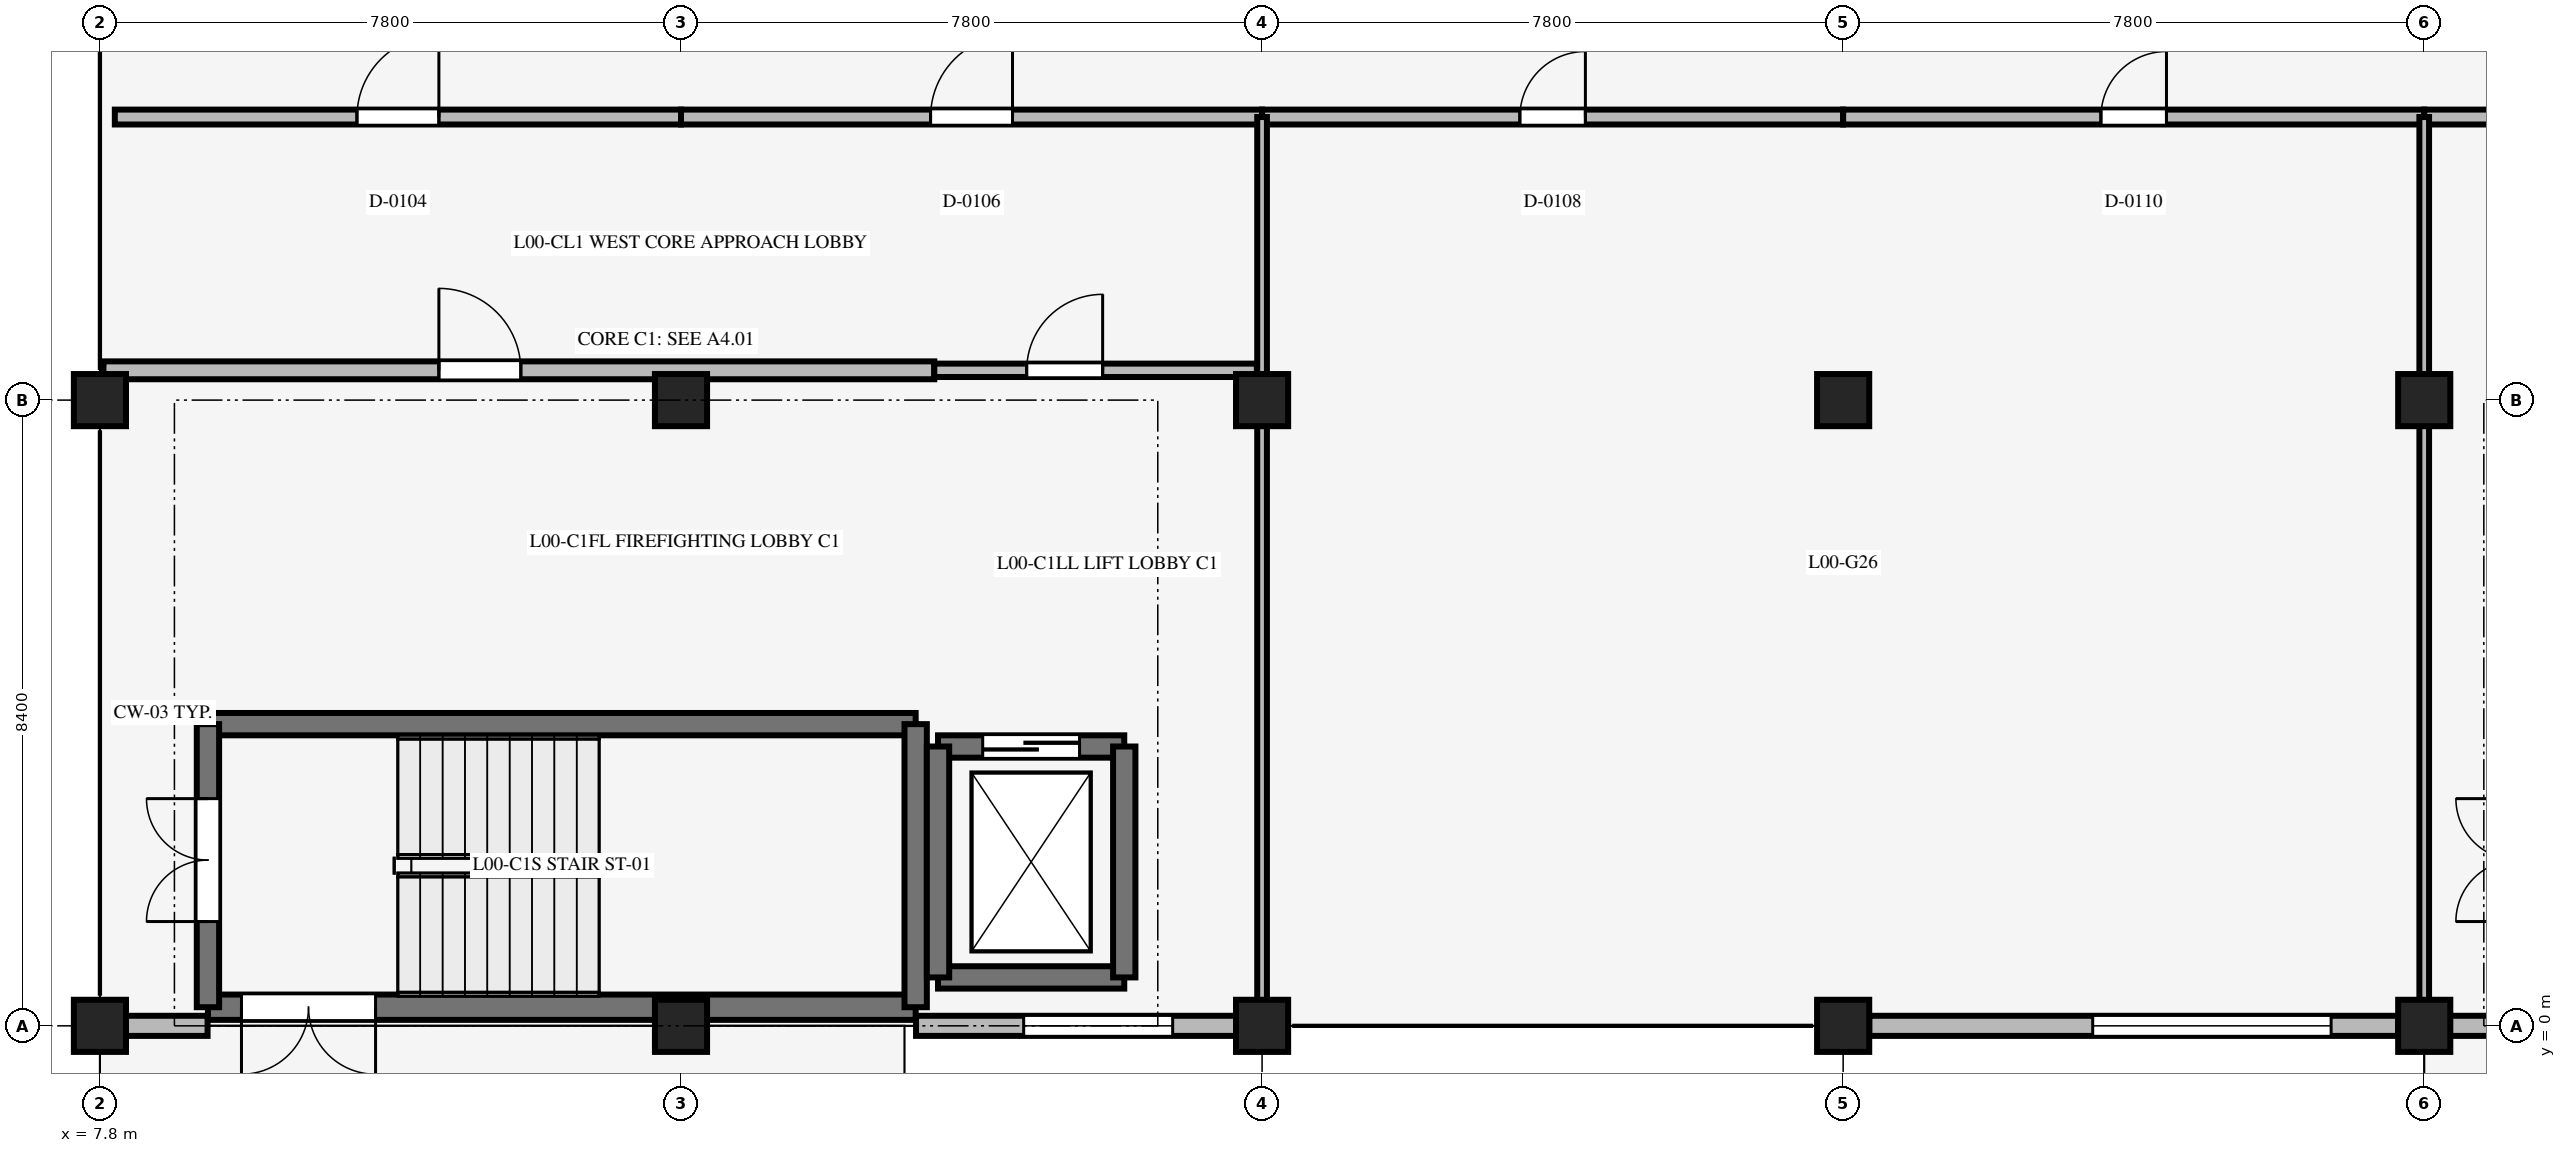
"""IFC4 building model, lengths in metres.
Left out: names, types, materials, properties, quantities, classifications, styles, units other than length and angle.
Written with IfcOpenShell. Run it as: python <this file> out.ifc"""

import sys

from ifc_helpers import new_model, si_unit, direction, frame, frame_2d, origin, origin_2d, place, context, subcontext, project, spatial, rectangle, extrude, element, fill, save


model = new_model("IFC4")
c1 = context("Model", 3, precision=1e-05, world=origin(), true_north=direction((0.0, 1.0)))
c2 = subcontext(c1, "Body", "Model", "MODEL_VIEW")
j1 = project(units=[si_unit("LENGTHUNIT", "METRE"), si_unit("PLANEANGLEUNIT", "RADIAN")], contexts=[c1])
p1 = place(None, origin())
s1 = spatial("IfcSite", under=j1, at=p1, CompositionType="ELEMENT")
p2 = place(p1, origin())
s2 = spatial("IfcBuilding", under=s1, at=p2, CompositionType="ELEMENT")
p3 = place(p2, origin())
s3 = spatial("IfcBuildingStorey", under=s2, at=p3, CompositionType="ELEMENT", Elevation=0.0)
for number, where, z_axis, x_axis in (
    (1, (7.8, 0.0, 0.0), (0.0, 0.0, 1.0), (1.0, 0.0, 0.0)),
    (2, (7.8, 8.4, 0.0), (0.0, 0.0, 1.0), (1.0, 0.0, 0.0)),
    (3, (15.6, 0.0, 0.0), (0.0, 0.0, 1.0), (1.0, 0.0, 0.0)),
    (4, (15.6, 8.4, 0.0), (0.0, 0.0, 1.0), (1.0, 0.0, 0.0)),
    (5, (23.4, 0.0, 0.0), (0.0, 0.0, 1.0), (1.0, 0.0, 0.0)),
    (6, (23.4, 8.4, 0.0), (0.0, 0.0, 1.0), (1.0, 0.0, 0.0)),
    (7, (31.2, 0.0, 0.0), (0.0, 0.0, 1.0), (1.0, 0.0, 0.0)),
    (8, (31.2, 8.4, 0.0), (0.0, 0.0, 1.0), (1.0, 0.0, 0.0)),
    (9, (39.0, 0.0, 0.0), (0.0, 0.0, 1.0), (1.0, 0.0, 0.0)),
    (10, (39.0, 8.4, 0.0), (0.0, 0.0, 1.0), (1.0, 0.0, 0.0)),
):
    element("IfcColumn", number, at=place(p3, frame(where, z_axis=z_axis, x_axis=x_axis)), inside=s3, PredefinedType="COLUMN", context=c2, shape_type="SweptSolid", body=[
        extrude(rectangle(XDim=0.7, YDim=0.7, at=origin_2d()), origin(), (0.0, 0.0, 1.0), 6.0),
    ])
p4 = place(p3, frame((18.75, 0.25, 0.0), z_axis=(0.0, 0.0, 1.0), x_axis=(-1.0, 0.0, 0.0)))
e11 = element("IfcWall", 11, at=p4, inside=s3, PredefinedType="STANDARD", context=c2, shape_type="SweptSolid", body=[
    extrude(rectangle(XDim=9.5, YDim=0.34, at=frame_2d((4.75, 0.0))), origin(), (0.0, 0.0, 1.0), 6.0),
])
p5 = place(p4, frame((7.25, 0.0, 0.0)))
e12 = element("IfcOpeningElement", 12, at=p5, cuts=e11, PredefinedType="OPENING", context=c2, shape_type="SweptSolid", body=[
    extrude(rectangle(XDim=1.8, YDim=2.25, at=frame_2d((0.9, 1.125))), frame((0.0, 0.18, 0.0), z_axis=(0.0, -1.0, 0.0), x_axis=(1.0, 0.0, 0.0)), (0.0, 0.0, 1.0), 0.36),
])
p6 = place(p3, frame((9.25, 4.05, 0.0), z_axis=(0.0, 0.0, 1.0), x_axis=(1.0, 0.0, 0.0)))
e13 = element("IfcWall", 13, at=p6, inside=s3, PredefinedType="SHEAR", context=c2, shape_type="SweptSolid", body=[
    extrude(rectangle(XDim=9.5, YDim=0.3, at=frame_2d((4.75, 0.0))), origin(), (0.0, 0.0, 1.0), 6.0),
])
p7 = place(p3, frame((9.25, 0.25, 0.0), z_axis=(0.0, 0.0, 1.0), x_axis=(0.0, 1.0, 0.0)))
e14 = element("IfcWall", 14, at=p7, inside=s3, PredefinedType="SHEAR", context=c2, shape_type="SweptSolid", body=[
    extrude(rectangle(XDim=3.8, YDim=0.3, at=frame_2d((1.9, 0.0))), origin(), (0.0, 0.0, 1.0), 6.0),
])
p8 = place(p7, frame((1.15, 0.0, 0.0)))
e15 = element("IfcOpeningElement", 15, at=p8, cuts=e14, PredefinedType="OPENING", context=c2, shape_type="SweptSolid", body=[
    extrude(rectangle(XDim=1.65, YDim=2.2, at=frame_2d((0.825, 1.1))), frame((0.0, 0.16, 0.0), z_axis=(0.0, -1.0, 0.0), x_axis=(1.0, 0.0, 0.0)), (0.0, 0.0, 1.0), 0.32),
])
p9 = place(p3, frame((18.75, 0.25, 0.0), z_axis=(0.0, 0.0, 1.0), x_axis=(0.0, 1.0, 0.0)))
e16 = element("IfcWall", 16, at=p9, inside=s3, PredefinedType="SHEAR", context=c2, shape_type="SweptSolid", body=[
    extrude(rectangle(XDim=3.8, YDim=0.3, at=frame_2d((1.9, 0.0))), origin(), (0.0, 0.0, 1.0), 6.0),
])
p10 = place(p3, frame((19.05, 0.65, 0.0), z_axis=(0.0, 0.0, 1.0), x_axis=(1.0, 0.0, 0.0)))
e17 = element("IfcWall", 17, at=p10, inside=s3, PredefinedType="SHEAR", context=c2, shape_type="SweptSolid", body=[
    extrude(rectangle(XDim=2.5, YDim=0.3, at=frame_2d((1.25, 0.0))), origin(), (0.0, 0.0, 1.0), 5.66),
])
p11 = place(p3, frame((19.05, 3.75, 0.0), z_axis=(0.0, 0.0, 1.0), x_axis=(1.0, 0.0, 0.0)))
e18 = element("IfcWall", 18, at=p11, inside=s3, PredefinedType="SHEAR", context=c2, shape_type="SweptSolid", body=[
    extrude(rectangle(XDim=2.5, YDim=0.3, at=frame_2d((1.25, 0.0))), origin(), (0.0, 0.0, 1.0), 5.66),
])
p12 = place(p11, frame((0.6, 0.0, 0.0)))
e19 = element("IfcOpeningElement", 19, at=p12, cuts=e18, PredefinedType="OPENING", context=c2, shape_type="SweptSolid", body=[
    extrude(rectangle(XDim=1.3, YDim=2.2, at=frame_2d((0.65, 1.1))), frame((0.0, 0.16, 0.0), z_axis=(0.0, -1.0, 0.0), x_axis=(1.0, 0.0, 0.0)), (0.0, 0.0, 1.0), 0.32),
])
for number, where, z_axis, x_axis in (
    (20, (19.05, 0.65, 0.0), (0.0, 0.0, 1.0), (0.0, 1.0, 0.0)),
    (21, (21.55, 0.65, 0.0), (0.0, 0.0, 1.0), (0.0, 1.0, 0.0)),
):
    element("IfcWall", number, at=place(p3, frame(where, z_axis=z_axis, x_axis=x_axis)), inside=s3, PredefinedType="SHEAR", context=c2, shape_type="SweptSolid", body=[
        extrude(rectangle(XDim=3.1, YDim=0.3, at=frame_2d((1.55, 0.0))), origin(), (0.0, 0.0, 1.0), 5.66),
    ])
p13 = place(p3, frame((9.245, 0.0, 0.0), z_axis=(0.0, 0.0, 1.0), x_axis=(-1.0, 0.0, 0.0)))
e22 = element("IfcWall", 22, at=p13, inside=s3, PredefinedType="STANDARD", context=c2, shape_type="SweptSolid", body=[
    extrude(rectangle(XDim=1.145, YDim=0.27, at=frame_2d((0.573, 0.0))), origin(), (0.0, 0.0, 1.0), 5.75),
])
p14 = place(p3, frame((23.05, 0.0, 0.0), z_axis=(0.0, 0.0, 1.0), x_axis=(-1.0, 0.0, 0.0)))
e23 = element("IfcWall", 23, at=p14, inside=s3, PredefinedType="STANDARD", context=c2, shape_type="SweptSolid", body=[
    extrude(rectangle(XDim=4.295, YDim=0.27, at=frame_2d((2.147, 0.0))), origin(), (0.0, 0.0, 1.0), 5.75),
])
p15 = place(p14, frame((0.85, 0.0, 1.2)))
e24 = element("IfcOpeningElement", 24, at=p15, cuts=e23, PredefinedType="OPENING", context=c2, shape_type="SweptSolid", body=[
    extrude(rectangle(XDim=2.0, YDim=0.9, at=frame_2d((1.0, 0.45))), frame((0.0, 0.145, 0.0), z_axis=(0.0, -1.0, 0.0), x_axis=(1.0, 0.0, 0.0)), (0.0, 0.0, 1.0), 0.29),
])
p16 = place(p3, frame((38.65, 0.0, 0.0), z_axis=(0.0, 0.0, 1.0), x_axis=(-1.0, 0.0, 0.0)))
e25 = element("IfcWall", 25, at=p16, inside=s3, PredefinedType="STANDARD", context=c2, shape_type="SweptSolid", body=[
    extrude(rectangle(XDim=7.1, YDim=0.27, at=frame_2d((3.55, 0.0))), origin(), (0.0, 0.0, 1.0), 5.381),
])
p17 = place(p16, frame((0.9, 0.0, 0.9)))
e26 = element("IfcOpeningElement", 26, at=p17, cuts=e25, PredefinedType="OPENING", context=c2, shape_type="SweptSolid", body=[
    extrude(rectangle(XDim=3.2, YDim=2.1, at=frame_2d((1.6, 1.05))), frame((0.0, 0.145, 0.0), z_axis=(0.0, -1.0, 0.0), x_axis=(1.0, 0.0, 0.0)), (0.0, 0.0, 1.0), 0.29),
])
p18 = place(p3, frame((40.245, 0.0, 0.0), z_axis=(0.0, 0.0, 1.0), x_axis=(-1.0, 0.0, 0.0)))
e27 = element("IfcWall", 27, at=p18, inside=s3, PredefinedType="STANDARD", context=c2, shape_type="SweptSolid", body=[
    extrude(rectangle(XDim=0.925, YDim=0.27, at=frame_2d((0.462, 0.0))), origin(), (0.0, 0.0, 1.0), 5.75),
])
p19 = place(p3, frame((8.0, 12.2, 0.0), z_axis=(0.0, 0.0, 1.0), x_axis=(1.0, 0.0, 0.0)))
e28 = element("IfcWall", 28, at=p19, inside=s3, PredefinedType="STANDARD", context=c2, shape_type="SweptSolid", body=[
    extrude(rectangle(XDim=7.6, YDim=0.2, at=frame_2d((3.8, 0.0))), origin(), (0.0, 0.0, 1.0), 3.05),
])
p20 = place(p19, frame((3.25, 0.0, 0.0)))
e29 = element("IfcOpeningElement", 29, at=p20, cuts=e28, PredefinedType="OPENING", context=c2, shape_type="SweptSolid", body=[
    extrude(rectangle(XDim=1.1, YDim=2.2, at=frame_2d((0.55, 1.1))), frame((0.0, 0.11, 0.0), z_axis=(0.0, -1.0, 0.0), x_axis=(1.0, 0.0, 0.0)), (0.0, 0.0, 1.0), 0.22),
])
p21 = place(p3, frame((15.6, 12.2, 0.0), z_axis=(0.0, 0.0, 1.0), x_axis=(1.0, 0.0, 0.0)))
e30 = element("IfcWall", 30, at=p21, inside=s3, PredefinedType="STANDARD", context=c2, shape_type="SweptSolid", body=[
    extrude(rectangle(XDim=7.8, YDim=0.2, at=frame_2d((3.9, 0.0))), origin(), (0.0, 0.0, 1.0), 3.05),
])
p22 = place(p21, frame((3.35, 0.0, 0.0)))
e31 = element("IfcOpeningElement", 31, at=p22, cuts=e30, PredefinedType="OPENING", context=c2, shape_type="SweptSolid", body=[
    extrude(rectangle(XDim=1.1, YDim=2.2, at=frame_2d((0.55, 1.1))), frame((0.0, 0.11, 0.0), z_axis=(0.0, -1.0, 0.0), x_axis=(1.0, 0.0, 0.0)), (0.0, 0.0, 1.0), 0.22),
])
p23 = place(p3, frame((23.4, 12.2, 0.0), z_axis=(0.0, 0.0, 1.0), x_axis=(1.0, 0.0, 0.0)))
e32 = element("IfcWall", 32, at=p23, inside=s3, PredefinedType="STANDARD", context=c2, shape_type="SweptSolid", body=[
    extrude(rectangle(XDim=7.8, YDim=0.2, at=frame_2d((3.9, 0.0))), origin(), (0.0, 0.0, 1.0), 3.05),
])
p24 = place(p23, frame((3.46, 0.0, 0.0)))
e33 = element("IfcOpeningElement", 33, at=p24, cuts=e32, PredefinedType="OPENING", context=c2, shape_type="SweptSolid", body=[
    extrude(rectangle(XDim=0.88, YDim=2.1, at=frame_2d((0.44, 1.05))), frame((0.0, 0.11, 0.0), z_axis=(0.0, -1.0, 0.0), x_axis=(1.0, 0.0, 0.0)), (0.0, 0.0, 1.0), 0.22),
])
p25 = place(p3, frame((31.2, 12.2, 0.0), z_axis=(0.0, 0.0, 1.0), x_axis=(1.0, 0.0, 0.0)))
e34 = element("IfcWall", 34, at=p25, inside=s3, PredefinedType="STANDARD", context=c2, shape_type="SweptSolid", body=[
    extrude(rectangle(XDim=7.8, YDim=0.2, at=frame_2d((3.9, 0.0))), origin(), (0.0, 0.0, 1.0), 3.05),
])
p26 = place(p25, frame((3.46, 0.0, 0.0)))
e35 = element("IfcOpeningElement", 35, at=p26, cuts=e34, PredefinedType="OPENING", context=c2, shape_type="SweptSolid", body=[
    extrude(rectangle(XDim=0.88, YDim=2.1, at=frame_2d((0.44, 1.05))), frame((0.0, 0.11, 0.0), z_axis=(0.0, -1.0, 0.0), x_axis=(1.0, 0.0, 0.0)), (0.0, 0.0, 1.0), 0.22),
])
p27 = place(p3, frame((39.0, 12.2, 0.0), z_axis=(0.0, 0.0, 1.0), x_axis=(1.0, 0.0, 0.0)))
e36 = element("IfcWall", 36, at=p27, inside=s3, PredefinedType="STANDARD", context=c2, shape_type="SweptSolid", body=[
    extrude(rectangle(XDim=7.8, YDim=0.2, at=frame_2d((3.9, 0.0))), origin(), (0.0, 0.0, 1.0), 3.05),
])
p28 = place(p27, frame((3.46, 0.0, 0.0)))
e37 = element("IfcOpeningElement", 37, at=p28, cuts=e36, PredefinedType="OPENING", context=c2, shape_type="SweptSolid", body=[
    extrude(rectangle(XDim=0.88, YDim=2.1, at=frame_2d((0.44, 1.05))), frame((0.0, 0.11, 0.0), z_axis=(0.0, -1.0, 0.0), x_axis=(1.0, 0.0, 0.0)), (0.0, 0.0, 1.0), 0.22),
])
p29 = place(p3, frame((23.4, 0.3, 0.0), z_axis=(0.0, 0.0, 1.0), x_axis=(0.0, 1.0, 0.0)))
e38 = element("IfcWall", 38, at=p29, inside=s3, PredefinedType="STANDARD", context=c2, shape_type="SweptSolid", body=[
    extrude(rectangle(XDim=7.8, YDim=0.13, at=frame_2d((3.9, 0.0))), origin(), (0.0, 0.0, 1.0), 3.05),
])
p30 = place(p3, frame((23.4, 8.7, 0.0), z_axis=(0.0, 0.0, 1.0), x_axis=(0.0, 1.0, 0.0)))
e39 = element("IfcWall", 39, at=p30, inside=s3, PredefinedType="STANDARD", context=c2, shape_type="SweptSolid", body=[
    extrude(rectangle(XDim=3.5, YDim=0.13, at=frame_2d((1.75, 0.0))), origin(), (0.0, 0.0, 1.0), 3.05),
])
p31 = place(p3, frame((39.0, 0.3, 0.0), z_axis=(0.0, 0.0, 1.0), x_axis=(0.0, 1.0, 0.0)))
e40 = element("IfcWall", 40, at=p31, inside=s3, PredefinedType="STANDARD", context=c2, shape_type="SweptSolid", body=[
    extrude(rectangle(XDim=7.8, YDim=0.13, at=frame_2d((3.9, 0.0))), origin(), (0.0, 0.0, 1.0), 3.05),
])
p32 = place(p3, frame((39.0, 8.7, 0.0), z_axis=(0.0, 0.0, 1.0), x_axis=(0.0, 1.0, 0.0)))
e41 = element("IfcWall", 41, at=p32, inside=s3, PredefinedType="STANDARD", context=c2, shape_type="SweptSolid", body=[
    extrude(rectangle(XDim=3.5, YDim=0.13, at=frame_2d((1.75, 0.0))), origin(), (0.0, 0.0, 1.0), 3.05),
])
p33 = place(p3, frame((7.847, 8.8, 0.0), z_axis=(0.0, 0.0, 1.0), x_axis=(1.0, 0.0, 0.0)))
e42 = element("IfcWall", 42, at=p33, inside=s3, PredefinedType="STANDARD", context=c2, shape_type="SweptSolid", body=[
    extrude(rectangle(XDim=11.153, YDim=0.24, at=frame_2d((5.576, 0.0))), origin(), (0.0, 0.0, 1.0), 3.05),
])
p34 = place(p33, frame((4.502, 0.0, 0.0)))
e43 = element("IfcOpeningElement", 43, at=p34, cuts=e42, PredefinedType="OPENING", context=c2, shape_type="SweptSolid", body=[
    extrude(rectangle(XDim=1.1, YDim=2.2, at=frame_2d((0.55, 1.1))), frame((0.0, 0.13, 0.0), z_axis=(0.0, -1.0, 0.0), x_axis=(1.0, 0.0, 0.0)), (0.0, 0.0, 1.0), 0.26),
])
p35 = place(p3, frame((19.0, 8.8, 0.0), z_axis=(0.0, 0.0, 1.0), x_axis=(1.0, 0.0, 0.0)))
e44 = element("IfcWall", 44, at=p35, inside=s3, PredefinedType="STANDARD", context=c2, shape_type="SweptSolid", body=[
    extrude(rectangle(XDim=4.33, YDim=0.18, at=frame_2d((2.165, 0.0))), origin(), (0.0, 0.0, 1.0), 3.05),
])
p36 = place(p35, frame((1.24, 0.0, 0.0)))
e45 = element("IfcOpeningElement", 45, at=p36, cuts=e44, PredefinedType="OPENING", context=c2, shape_type="SweptSolid", body=[
    extrude(rectangle(XDim=1.02, YDim=2.15, at=frame_2d((0.51, 1.075))), frame((0.0, 0.1, 0.0), z_axis=(0.0, -1.0, 0.0), x_axis=(1.0, 0.0, 0.0)), (0.0, 0.0, 1.0), 0.2),
])
p37 = place(p15, origin())
e46 = element("IfcWindow", 46, at=p37, inside=s3, PartitioningType="SINGLE_PANEL", PredefinedType="WINDOW", context=c2, shape_type="SweptSolid", body=[
    extrude(rectangle(XDim=2.0, YDim=0.9, at=frame_2d((1.0, 0.45))), frame((0.0, 0.03, 0.0), z_axis=(0.0, -1.0, 0.0), x_axis=(1.0, 0.0, 0.0)), (0.0, 0.0, 1.0), 0.06),
])
fill(e24, e46)
p38 = place(p17, origin())
e47 = element("IfcWindow", 47, at=p38, inside=s3, PartitioningType="SINGLE_PANEL", PredefinedType="WINDOW", context=c2, shape_type="SweptSolid", body=[
    extrude(rectangle(XDim=3.2, YDim=2.1, at=frame_2d((1.6, 1.05))), frame((0.0, 0.03, 0.0), z_axis=(0.0, -1.0, 0.0), x_axis=(1.0, 0.0, 0.0)), (0.0, 0.0, 1.0), 0.06),
])
fill(e26, e47)
p39 = place(p8, origin())
e48 = element("IfcDoor", 48, at=p39, inside=s3, OperationType="DOUBLE_DOOR_SINGLE_SWING", PredefinedType="DOOR", context=c2, shape_type="SweptSolid", body=[
    extrude(rectangle(XDim=1.65, YDim=2.2, at=frame_2d((0.825, 1.1))), frame((0.0, 0.025, 0.0), z_axis=(0.0, -1.0, 0.0), x_axis=(1.0, 0.0, 0.0)), (0.0, 0.0, 1.0), 0.05),
])
fill(e15, e48)
p40 = place(p5, origin())
e49 = element("IfcDoor", 49, at=p40, inside=s3, OperationType="DOUBLE_DOOR_SINGLE_SWING", PredefinedType="DOOR", context=c2, shape_type="SweptSolid", body=[
    extrude(rectangle(XDim=1.8, YDim=2.25, at=frame_2d((0.9, 1.125))), frame((0.0, 0.025, 0.0), z_axis=(0.0, -1.0, 0.0), x_axis=(1.0, 0.0, 0.0)), (0.0, 0.0, 1.0), 0.05),
])
fill(e12, e49)
p41 = place(p12, origin())
e50 = element("IfcDoor", 50, at=p41, inside=s3, OperationType="DOUBLE_DOOR_SLIDING", PredefinedType="DOOR", context=c2, shape_type="SweptSolid", body=[
    extrude(rectangle(XDim=1.3, YDim=2.2, at=frame_2d((0.65, 1.1))), frame((0.0, 0.025, 0.0), z_axis=(0.0, -1.0, 0.0), x_axis=(1.0, 0.0, 0.0)), (0.0, 0.0, 1.0), 0.05),
])
fill(e19, e50)
p42 = place(p20, origin())
e51 = element("IfcDoor", 51, at=p42, inside=s3, OperationType="SINGLE_SWING_RIGHT", PredefinedType="DOOR", context=c2, shape_type="SweptSolid", body=[
    extrude(rectangle(XDim=1.1, YDim=2.2, at=frame_2d((0.55, 1.1))), frame((0.0, 0.025, 0.0), z_axis=(0.0, -1.0, 0.0), x_axis=(1.0, 0.0, 0.0)), (0.0, 0.0, 1.0), 0.05),
])
fill(e29, e51)
p43 = place(p22, origin())
e52 = element("IfcDoor", 52, at=p43, inside=s3, OperationType="SINGLE_SWING_RIGHT", PredefinedType="DOOR", context=c2, shape_type="SweptSolid", body=[
    extrude(rectangle(XDim=1.1, YDim=2.2, at=frame_2d((0.55, 1.1))), frame((0.0, 0.025, 0.0), z_axis=(0.0, -1.0, 0.0), x_axis=(1.0, 0.0, 0.0)), (0.0, 0.0, 1.0), 0.05),
])
fill(e31, e52)
p44 = place(p24, origin())
e53 = element("IfcDoor", 53, at=p44, inside=s3, OperationType="SINGLE_SWING_RIGHT", PredefinedType="DOOR", context=c2, shape_type="SweptSolid", body=[
    extrude(rectangle(XDim=0.88, YDim=2.1, at=frame_2d((0.44, 1.05))), frame((0.0, 0.025, 0.0), z_axis=(0.0, -1.0, 0.0), x_axis=(1.0, 0.0, 0.0)), (0.0, 0.0, 1.0), 0.05),
])
fill(e33, e53)
p45 = place(p26, origin())
e54 = element("IfcDoor", 54, at=p45, inside=s3, OperationType="SINGLE_SWING_RIGHT", PredefinedType="DOOR", context=c2, shape_type="SweptSolid", body=[
    extrude(rectangle(XDim=0.88, YDim=2.1, at=frame_2d((0.44, 1.05))), frame((0.0, 0.025, 0.0), z_axis=(0.0, -1.0, 0.0), x_axis=(1.0, 0.0, 0.0)), (0.0, 0.0, 1.0), 0.05),
])
fill(e35, e54)
p46 = place(p34, origin())
e55 = element("IfcDoor", 55, at=p46, inside=s3, OperationType="SINGLE_SWING_LEFT", PredefinedType="DOOR", context=c2, shape_type="SweptSolid", body=[
    extrude(rectangle(XDim=1.1, YDim=2.2, at=frame_2d((0.55, 1.1))), frame((0.0, 0.025, 0.0), z_axis=(0.0, -1.0, 0.0), x_axis=(1.0, 0.0, 0.0)), (0.0, 0.0, 1.0), 0.05),
])
fill(e43, e55)
p47 = place(p36, origin())
e56 = element("IfcDoor", 56, at=p47, inside=s3, OperationType="SINGLE_SWING_RIGHT", PredefinedType="DOOR", context=c2, shape_type="SweptSolid", body=[
    extrude(rectangle(XDim=1.02, YDim=2.15, at=frame_2d((0.51, 1.075))), frame((0.0, 0.025, 0.0), z_axis=(0.0, -1.0, 0.0), x_axis=(1.0, 0.0, 0.0)), (0.0, 0.0, 1.0), 0.05),
])
fill(e45, e56)
save(model, sys.argv[1])
